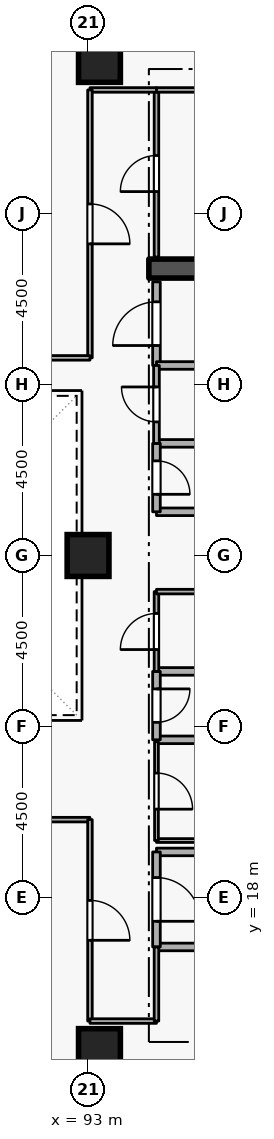
"""IFC4 building model, lengths in metres.
Left out: names, types, materials, properties, quantities, classifications, styles, units other than length and angle.
Written with IfcOpenShell. Run it as: python <this file> out.ifc"""

import sys

from ifc_helpers import new_model, si_unit, direction, frame, frame_2d, origin, origin_2d, place, context, subcontext, project, spatial, rectangle, extrude, element, fill, save


model = new_model("IFC4")
c1 = context("Model", 3, precision=1e-05, world=origin(), true_north=direction((0.0, 1.0)))
c2 = subcontext(c1, "Body", "Model", "MODEL_VIEW")
j1 = project(units=[si_unit("LENGTHUNIT", "METRE"), si_unit("PLANEANGLEUNIT", "RADIAN")], contexts=[c1])
p1 = place(None, origin())
s1 = spatial("IfcSite", under=j1, at=p1, CompositionType="ELEMENT")
p2 = place(p1, origin())
s2 = spatial("IfcBuilding", under=s1, at=p2, CompositionType="ELEMENT")
p3 = place(p2, frame((0.0, 0.0, 174.3)))
s3 = spatial("IfcBuildingStorey", under=s2, at=p3, CompositionType="ELEMENT", Elevation=174.3)
p4 = place(p3, frame((94.6, 34.55, 0.0), z_axis=(0.0, 0.0, 1.0), x_axis=(1.0, 0.0, 0.0)))
e1 = element("IfcWall", 1, at=p4, inside=s3, PredefinedType="SHEAR", context=c2, shape_type="SweptSolid", body=[
    extrude(rectangle(XDim=5.8, YDim=0.5, at=frame_2d((2.9, 0.0))), origin(), (0.0, 0.0, 1.0), 4.2),
])
for number, where, z_axis, x_axis in (
    (2, (93.3, 14.0, 0.0), (0.0, 0.0, 1.0), (1.0, 0.0, 0.0)),
    (3, (93.3, 40.0, 0.0), (0.0, 0.0, 1.0), (1.0, 0.0, 0.0)),
    (4, (93.0, 27.0, 0.0), (0.0, 0.0, 1.0), (1.0, 0.0, 0.0)),
):
    element("IfcColumn", number, at=place(p3, frame(where, z_axis=z_axis, x_axis=x_axis)), inside=s3, PredefinedType="COLUMN", context=c2, shape_type="SweptSolid", body=[
        extrude(rectangle(XDim=1.1, YDim=1.1, at=origin_2d()), origin(), (0.0, 0.0, 1.0), 4.2),
    ])
p5 = place(p3, frame((94.8, 16.7, 0.0), z_axis=(0.0, 0.0, 1.0), x_axis=(1.0, 0.0, 0.0)))
e5 = element("IfcWall", 5, at=p5, inside=s3, PredefinedType="STANDARD", context=c2, shape_type="SweptSolid", body=[
    extrude(rectangle(XDim=5.7, YDim=0.2, at=frame_2d((2.85, 0.0))), origin(), (0.0, 0.0, 1.0), 3.94),
])
p6 = place(p3, frame((97.1, 19.2, 0.0), z_axis=(0.0, 0.0, 1.0), x_axis=(-1.0, 0.0, 0.0)))
e6 = element("IfcWall", 6, at=p6, inside=s3, PredefinedType="STANDARD", context=c2, shape_type="SweptSolid", body=[
    extrude(rectangle(XDim=2.3, YDim=0.2, at=frame_2d((1.15, 0.0))), origin(), (0.0, 0.0, 1.0), 3.145),
])
p7 = place(p3, frame((94.8, 19.2, 0.0), z_axis=(0.0, 0.0, 1.0), x_axis=(0.0, -1.0, 0.0)))
e7 = element("IfcWall", 7, at=p7, inside=s3, PredefinedType="STANDARD", context=c2, shape_type="SweptSolid", body=[
    extrude(rectangle(XDim=2.5, YDim=0.2, at=frame_2d((1.25, 0.0))), origin(), (0.0, 0.0, 1.0), 3.94),
])
p8 = place(p7, frame((0.675, 0.0, 0.0)))
e8 = element("IfcOpeningElement", 8, at=p8, cuts=e7, PredefinedType="OPENING", context=c2, shape_type="SweptSolid", body=[
    extrude(rectangle(XDim=1.15, YDim=2.1, at=frame_2d((0.575, 1.05))), frame((0.0, 0.11, 0.0), z_axis=(0.0, -1.0, 0.0), x_axis=(1.0, 0.0, 0.0)), (0.0, 0.0, 1.0), 0.22),
])
for number, where, z_axis, x_axis in (
    (9, (94.8, 28.15, 0.0), (0.0, 0.0, 1.0), (1.0, 0.0, 0.0)),
    (10, (96.85, 29.95, 0.0), (0.0, 0.0, 1.0), (-1.0, 0.0, 0.0)),
):
    element("IfcWall", number, at=place(p3, frame(where, z_axis=z_axis, x_axis=x_axis)), inside=s3, PredefinedType="STANDARD", context=c2, shape_type="SweptSolid", body=[
        extrude(rectangle(XDim=2.05, YDim=0.2, at=frame_2d((1.025, 0.0))), origin(), (0.0, 0.0, 1.0), 3.94),
    ])
p9 = place(p3, frame((94.8, 29.95, 0.0), z_axis=(0.0, 0.0, 1.0), x_axis=(0.0, -1.0, 0.0)))
e11 = element("IfcWall", 11, at=p9, inside=s3, PredefinedType="STANDARD", context=c2, shape_type="SweptSolid", body=[
    extrude(rectangle(XDim=1.8, YDim=0.2, at=frame_2d((0.9, 0.0))), origin(), (0.0, 0.0, 1.0), 3.94),
])
p10 = place(p9, frame((0.46, 0.0, 0.0)))
e12 = element("IfcOpeningElement", 12, at=p10, cuts=e11, PredefinedType="OPENING", context=c2, shape_type="SweptSolid", body=[
    extrude(rectangle(XDim=0.88, YDim=2.04, at=frame_2d((0.44, 1.02))), frame((0.0, 0.11, 0.0), z_axis=(0.0, -1.0, 0.0), x_axis=(1.0, 0.0, 0.0)), (0.0, 0.0, 1.0), 0.22),
])
for number, where, z_axis, x_axis in (
    (13, (94.8, 22.15, 0.0), (0.0, 0.0, 1.0), (1.0, 0.0, 0.0)),
    (14, (96.85, 23.95, 0.0), (0.0, 0.0, 1.0), (-1.0, 0.0, 0.0)),
):
    element("IfcWall", number, at=place(p3, frame(where, z_axis=z_axis, x_axis=x_axis)), inside=s3, PredefinedType="STANDARD", context=c2, shape_type="SweptSolid", body=[
        extrude(rectangle(XDim=2.05, YDim=0.2, at=frame_2d((1.025, 0.0))), origin(), (0.0, 0.0, 1.0), 3.94),
    ])
p11 = place(p3, frame((94.8, 23.95, 0.0), z_axis=(0.0, 0.0, 1.0), x_axis=(0.0, -1.0, 0.0)))
e15 = element("IfcWall", 15, at=p11, inside=s3, PredefinedType="STANDARD", context=c2, shape_type="SweptSolid", body=[
    extrude(rectangle(XDim=1.8, YDim=0.2, at=frame_2d((0.9, 0.0))), origin(), (0.0, 0.0, 1.0), 3.94),
])
p12 = place(p11, frame((0.46, 0.0, 0.0)))
e16 = element("IfcOpeningElement", 16, at=p12, cuts=e15, PredefinedType="OPENING", context=c2, shape_type="SweptSolid", body=[
    extrude(rectangle(XDim=0.88, YDim=2.04, at=frame_2d((0.44, 1.02))), frame((0.0, 0.11, 0.0), z_axis=(0.0, -1.0, 0.0), x_axis=(1.0, 0.0, 0.0)), (0.0, 0.0, 1.0), 0.22),
])
p13 = place(p3, frame((94.8, 32.0, 0.0), z_axis=(0.0, 0.0, 1.0), x_axis=(0.0, 1.0, 0.0)))
e17 = element("IfcWall", 17, at=p13, inside=s3, PredefinedType="STANDARD", context=c2, shape_type="SweptSolid", body=[
    extrude(rectangle(XDim=2.2, YDim=0.2, at=frame_2d((1.1, 0.0))), origin(), (0.0, 0.0, 1.0), 3.94),
])
p14 = place(p13, frame((0.525, 0.0, 0.0)))
e18 = element("IfcOpeningElement", 18, at=p14, cuts=e17, PredefinedType="OPENING", context=c2, shape_type="SweptSolid", body=[
    extrude(rectangle(XDim=1.15, YDim=2.1, at=frame_2d((0.575, 1.05))), frame((0.0, 0.11, 0.0), z_axis=(0.0, -1.0, 0.0), x_axis=(1.0, 0.0, 0.0)), (0.0, 0.0, 1.0), 0.22),
])
p15 = place(p3, frame((96.85, 32.0, 0.0), z_axis=(0.0, 0.0, 1.0), x_axis=(-1.0, 0.0, 0.0)))
e19 = element("IfcWall", 19, at=p15, inside=s3, PredefinedType="STANDARD", context=c2, shape_type="SweptSolid", body=[
    extrude(rectangle(XDim=2.05, YDim=0.2, at=frame_2d((1.025, 0.0))), origin(), (0.0, 0.0, 1.0), 3.94),
])
p16 = place(p3, frame((94.8, 19.5, 0.0), z_axis=(0.0, 0.0, 1.0), x_axis=(1.0, 0.0, 0.0)))
e20 = element("IfcWall", 20, at=p16, inside=s3, PredefinedType="PARTITIONING", context=c2, shape_type="SweptSolid", body=[
    extrude(rectangle(XDim=2.05, YDim=0.1, at=frame_2d((1.025, 0.0))), origin(), (0.0, 0.0, 1.0), 3.145),
])
p17 = place(p3, frame((94.8, 22.1, 0.0), z_axis=(0.0, 0.0, 1.0), x_axis=(0.0, -1.0, 0.0)))
e21 = element("IfcWall", 21, at=p17, inside=s3, PredefinedType="PARTITIONING", context=c2, shape_type="SweptSolid", body=[
    extrude(rectangle(XDim=2.6, YDim=0.1, at=frame_2d((1.3, 0.0))), origin(), (0.0, 0.0, 1.0), 3.94),
])
p18 = place(p17, frame((0.825, 0.0, 0.0)))
e22 = element("IfcOpeningElement", 22, at=p18, cuts=e21, PredefinedType="OPENING", context=c2, shape_type="SweptSolid", body=[
    extrude(rectangle(XDim=0.95, YDim=2.1, at=frame_2d((0.475, 1.05))), frame((0.0, 0.06, 0.0), z_axis=(0.0, -1.0, 0.0), x_axis=(1.0, 0.0, 0.0)), (0.0, 0.0, 1.0), 0.12),
])
p19 = place(p3, frame((94.8, 23.95, 0.0), z_axis=(0.0, 0.0, 1.0), x_axis=(0.0, 1.0, 0.0)))
e23 = element("IfcWall", 23, at=p19, inside=s3, PredefinedType="PARTITIONING", context=c2, shape_type="SweptSolid", body=[
    extrude(rectangle(XDim=2.1, YDim=0.12, at=frame_2d((1.05, 0.0))), origin(), (0.0, 0.0, 1.0), 3.94),
])
p20 = place(p19, frame((0.575, 0.0, 0.0)))
e24 = element("IfcOpeningElement", 24, at=p20, cuts=e23, PredefinedType="OPENING", context=c2, shape_type="SweptSolid", body=[
    extrude(rectangle(XDim=0.95, YDim=2.1, at=frame_2d((0.475, 1.05))), frame((0.0, 0.07, 0.0), z_axis=(0.0, -1.0, 0.0), x_axis=(1.0, 0.0, 0.0)), (0.0, 0.0, 1.0), 0.14),
])
p21 = place(p3, frame((94.8, 26.05, 0.0), z_axis=(0.0, 0.0, 1.0), x_axis=(1.0, 0.0, 0.0)))
e25 = element("IfcWall", 25, at=p21, inside=s3, PredefinedType="PARTITIONING", context=c2, shape_type="SweptSolid", body=[
    extrude(rectangle(XDim=2.05, YDim=0.12, at=frame_2d((1.025, 0.0))), origin(), (0.0, 0.0, 1.0), 3.94),
])
p22 = place(p3, frame((94.8, 29.95, 0.0), z_axis=(0.0, 0.0, 1.0), x_axis=(0.0, 1.0, 0.0)))
e26 = element("IfcWall", 26, at=p22, inside=s3, PredefinedType="PARTITIONING", context=c2, shape_type="SweptSolid", body=[
    extrude(rectangle(XDim=2.05, YDim=0.15, at=frame_2d((1.025, 0.0))), origin(), (0.0, 0.0, 1.0), 3.94),
])
p23 = place(p22, frame((0.565, 0.0, 0.0)))
e27 = element("IfcOpeningElement", 27, at=p23, cuts=e26, PredefinedType="OPENING", context=c2, shape_type="SweptSolid", body=[
    extrude(rectangle(XDim=0.92, YDim=2.08, at=frame_2d((0.46, 1.04))), frame((0.0, 0.085, 0.0), z_axis=(0.0, -1.0, 0.0), x_axis=(1.0, 0.0, 0.0)), (0.0, 0.0, 1.0), 0.17),
])
p24 = place(p3, frame((94.8, 34.85, 0.0), z_axis=(0.0, 0.0, 1.0), x_axis=(0.0, 1.0, 0.0)))
e28 = element("IfcWall", 28, at=p24, inside=s3, PredefinedType="PARTITIONING", context=c2, shape_type="SweptSolid", body=[
    extrude(rectangle(XDim=4.4, YDim=0.12, at=frame_2d((2.2, 0.0))), origin(), (0.0, 0.0, 1.0), 3.94),
])
p25 = place(p24, frame((1.725, 0.0, 0.0)))
e29 = element("IfcOpeningElement", 29, at=p25, cuts=e28, PredefinedType="OPENING", context=c2, shape_type="SweptSolid", body=[
    extrude(rectangle(XDim=0.95, YDim=2.1, at=frame_2d((0.475, 1.05))), frame((0.0, 0.07, 0.0), z_axis=(0.0, -1.0, 0.0), x_axis=(1.0, 0.0, 0.0)), (0.0, 0.0, 1.0), 0.14),
])
p26 = place(p3, frame((94.8, 39.25, 0.0), z_axis=(0.0, 0.0, 1.0), x_axis=(1.0, 0.0, 0.0)))
e30 = element("IfcWall", 30, at=p26, inside=s3, PredefinedType="PARTITIONING", context=c2, shape_type="SweptSolid", body=[
    extrude(rectangle(XDim=5.65, YDim=0.12, at=frame_2d((2.825, 0.0))), origin(), (0.0, 0.0, 1.0), 3.94),
])
p27 = place(p3, frame((88.5, 20.05, 0.0), z_axis=(0.0, 0.0, 1.0), x_axis=(1.0, 0.0, 0.0)))
e31 = element("IfcWall", 31, at=p27, inside=s3, PredefinedType="PARTITIONING", context=c2, shape_type="SweptSolid", body=[
    extrude(rectangle(XDim=4.55, YDim=0.12, at=frame_2d((2.275, 0.0))), origin(), (0.0, 0.0, 1.0), 3.94),
])
p28 = place(p3, frame((93.05, 20.05, 0.0), z_axis=(0.0, 0.0, 1.0), x_axis=(0.0, -1.0, 0.0)))
e32 = element("IfcWall", 32, at=p28, inside=s3, PredefinedType="PARTITIONING", context=c2, shape_type="SweptSolid", body=[
    extrude(rectangle(XDim=5.3, YDim=0.12, at=frame_2d((2.65, 0.0))), origin(), (0.0, 0.0, 1.0), 3.94),
])
p29 = place(p28, frame((2.125, 0.0, 0.0)))
e33 = element("IfcOpeningElement", 33, at=p29, cuts=e32, PredefinedType="OPENING", context=c2, shape_type="SweptSolid", body=[
    extrude(rectangle(XDim=1.05, YDim=2.1, at=frame_2d((0.525, 1.05))), frame((0.0, 0.07, 0.0), z_axis=(0.0, -1.0, 0.0), x_axis=(1.0, 0.0, 0.0)), (0.0, 0.0, 1.0), 0.14),
])
p30 = place(p3, frame((93.05, 14.75, 0.0), z_axis=(0.0, 0.0, 1.0), x_axis=(1.0, 0.0, 0.0)))
e34 = element("IfcWall", 34, at=p30, inside=s3, PredefinedType="PARTITIONING", context=c2, shape_type="SweptSolid", body=[
    extrude(rectangle(XDim=1.75, YDim=0.12, at=frame_2d((0.875, 0.0))), origin(), (0.0, 0.0, 1.0), 3.94),
])
p31 = place(p3, frame((94.8, 14.75, 0.0), z_axis=(0.0, 0.0, 1.0), x_axis=(0.0, 1.0, 0.0)))
e35 = element("IfcWall", 35, at=p31, inside=s3, PredefinedType="PARTITIONING", context=c2, shape_type="SweptSolid", body=[
    extrude(rectangle(XDim=1.95, YDim=0.12, at=frame_2d((0.975, 0.0))), origin(), (0.0, 0.0, 1.0), 3.94),
])
p32 = place(p3, frame((94.8, 39.25, 0.0), z_axis=(0.0, 0.0, 1.0), x_axis=(-1.0, 0.0, 0.0)))
e36 = element("IfcWall", 36, at=p32, inside=s3, PredefinedType="PARTITIONING", context=c2, shape_type="SweptSolid", body=[
    extrude(rectangle(XDim=1.75, YDim=0.12, at=frame_2d((0.875, 0.0))), origin(), (0.0, 0.0, 1.0), 3.94),
])
p33 = place(p3, frame((93.05, 39.25, 0.0), z_axis=(0.0, 0.0, 1.0), x_axis=(0.0, -1.0, 0.0)))
e37 = element("IfcWall", 37, at=p33, inside=s3, PredefinedType="PARTITIONING", context=c2, shape_type="SweptSolid", body=[
    extrude(rectangle(XDim=7.05, YDim=0.12, at=frame_2d((3.525, 0.0))), origin(), (0.0, 0.0, 1.0), 3.94),
])
p34 = place(p33, frame((3.0, 0.0, 0.0)))
e38 = element("IfcOpeningElement", 38, at=p34, cuts=e37, PredefinedType="OPENING", context=c2, shape_type="SweptSolid", body=[
    extrude(rectangle(XDim=1.05, YDim=2.1, at=frame_2d((0.525, 1.05))), frame((0.0, 0.07, 0.0), z_axis=(0.0, -1.0, 0.0), x_axis=(1.0, 0.0, 0.0)), (0.0, 0.0, 1.0), 0.14),
])
p35 = place(p3, frame((93.05, 32.2, 0.0), z_axis=(0.0, 0.0, 1.0), x_axis=(-1.0, 0.0, 0.0)))
e39 = element("IfcWall", 39, at=p35, inside=s3, PredefinedType="PARTITIONING", context=c2, shape_type="SweptSolid", body=[
    extrude(rectangle(XDim=4.55, YDim=0.12, at=frame_2d((2.275, 0.0))), origin(), (0.0, 0.0, 1.0), 3.94),
])
p36 = place(p8, origin())
e40 = element("IfcDoor", 40, at=p36, inside=s3, OperationType="SINGLE_SWING_RIGHT", PredefinedType="DOOR", context=c2, shape_type="SweptSolid", body=[
    extrude(rectangle(XDim=1.15, YDim=2.1, at=frame_2d((0.575, 1.05))), frame((0.0, 0.025, 0.0), z_axis=(0.0, -1.0, 0.0), x_axis=(1.0, 0.0, 0.0)), (0.0, 0.0, 1.0), 0.05),
])
fill(e8, e40)
p37 = place(p10, origin())
e41 = element("IfcDoor", 41, at=p37, inside=s3, OperationType="SINGLE_SWING_RIGHT", PredefinedType="DOOR", context=c2, shape_type="SweptSolid", body=[
    extrude(rectangle(XDim=0.88, YDim=2.04, at=frame_2d((0.44, 1.02))), frame((0.0, 0.025, 0.0), z_axis=(0.0, -1.0, 0.0), x_axis=(1.0, 0.0, 0.0)), (0.0, 0.0, 1.0), 0.05),
])
fill(e12, e41)
p38 = place(p12, origin())
e42 = element("IfcDoor", 42, at=p38, inside=s3, OperationType="SINGLE_SWING_LEFT", PredefinedType="DOOR", context=c2, shape_type="SweptSolid", body=[
    extrude(rectangle(XDim=0.88, YDim=2.04, at=frame_2d((0.44, 1.02))), frame((0.0, 0.025, 0.0), z_axis=(0.0, -1.0, 0.0), x_axis=(1.0, 0.0, 0.0)), (0.0, 0.0, 1.0), 0.05),
])
fill(e16, e42)
p39 = place(p18, origin())
e43 = element("IfcDoor", 43, at=p39, inside=s3, OperationType="SINGLE_SWING_RIGHT", PredefinedType="DOOR", context=c2, shape_type="SweptSolid", body=[
    extrude(rectangle(XDim=0.95, YDim=2.1, at=frame_2d((0.475, 1.05))), frame((0.0, 0.025, 0.0), z_axis=(0.0, -1.0, 0.0), x_axis=(1.0, 0.0, 0.0)), (0.0, 0.0, 1.0), 0.05),
])
fill(e22, e43)
p40 = place(p20, origin())
e44 = element("IfcDoor", 44, at=p40, inside=s3, OperationType="SINGLE_SWING_LEFT", PredefinedType="DOOR", context=c2, shape_type="SweptSolid", body=[
    extrude(rectangle(XDim=0.95, YDim=2.1, at=frame_2d((0.475, 1.05))), frame((0.0, 0.025, 0.0), z_axis=(0.0, -1.0, 0.0), x_axis=(1.0, 0.0, 0.0)), (0.0, 0.0, 1.0), 0.05),
])
fill(e24, e44)
p41 = place(p23, origin())
e45 = element("IfcDoor", 45, at=p41, inside=s3, OperationType="SINGLE_SWING_RIGHT", PredefinedType="DOOR", context=c2, shape_type="SweptSolid", body=[
    extrude(rectangle(XDim=0.92, YDim=2.08, at=frame_2d((0.46, 1.04))), frame((0.0, 0.025, 0.0), z_axis=(0.0, -1.0, 0.0), x_axis=(1.0, 0.0, 0.0)), (0.0, 0.0, 1.0), 0.05),
])
fill(e27, e45)
p42 = place(p14, origin())
e46 = element("IfcDoor", 46, at=p42, inside=s3, OperationType="SINGLE_SWING_LEFT", PredefinedType="DOOR", context=c2, shape_type="SweptSolid", body=[
    extrude(rectangle(XDim=1.15, YDim=2.1, at=frame_2d((0.575, 1.05))), frame((0.0, 0.025, 0.0), z_axis=(0.0, -1.0, 0.0), x_axis=(1.0, 0.0, 0.0)), (0.0, 0.0, 1.0), 0.05),
])
fill(e18, e46)
p43 = place(p25, origin())
e47 = element("IfcDoor", 47, at=p43, inside=s3, OperationType="SINGLE_SWING_LEFT", PredefinedType="DOOR", context=c2, shape_type="SweptSolid", body=[
    extrude(rectangle(XDim=0.95, YDim=2.1, at=frame_2d((0.475, 1.05))), frame((0.0, 0.025, 0.0), z_axis=(0.0, -1.0, 0.0), x_axis=(1.0, 0.0, 0.0)), (0.0, 0.0, 1.0), 0.05),
])
fill(e29, e47)
p44 = place(p29, origin())
e48 = element("IfcDoor", 48, at=p44, inside=s3, OperationType="SINGLE_SWING_RIGHT", PredefinedType="DOOR", context=c2, shape_type="SweptSolid", body=[
    extrude(rectangle(XDim=1.05, YDim=2.1, at=frame_2d((0.525, 1.05))), frame((0.0, 0.025, 0.0), z_axis=(0.0, -1.0, 0.0), x_axis=(1.0, 0.0, 0.0)), (0.0, 0.0, 1.0), 0.05),
])
fill(e33, e48)
p45 = place(p34, origin())
e49 = element("IfcDoor", 49, at=p45, inside=s3, OperationType="SINGLE_SWING_RIGHT", PredefinedType="DOOR", context=c2, shape_type="SweptSolid", body=[
    extrude(rectangle(XDim=1.05, YDim=2.1, at=frame_2d((0.525, 1.05))), frame((0.0, 0.025, 0.0), z_axis=(0.0, -1.0, 0.0), x_axis=(1.0, 0.0, 0.0)), (0.0, 0.0, 1.0), 0.05),
])
fill(e38, e49)
save(model, sys.argv[1])
